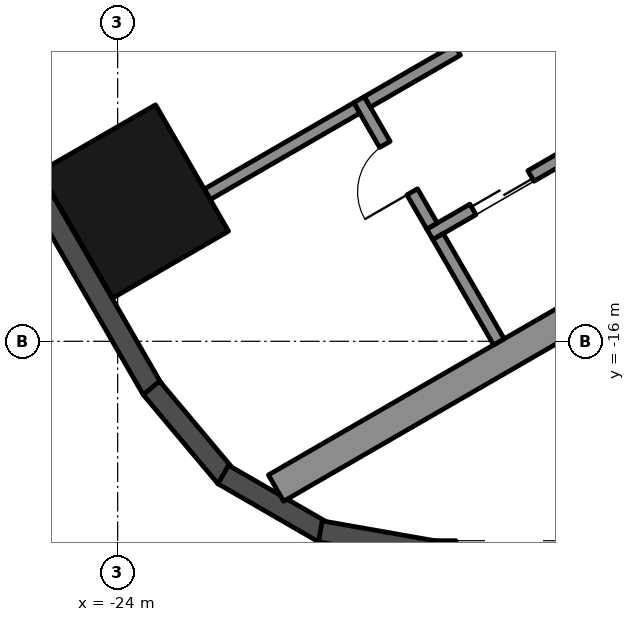
"""IFC4 building model, lengths in metres.
Left out: names, types, materials, properties, quantities, classifications, styles, units other than length and angle.
Written with IfcOpenShell. Run it as: python <this file> out.ifc"""

import sys

from ifc_helpers import new_model, si_unit, direction, frame, frame_2d, origin, origin_2d, place, context, subcontext, project, spatial, rectangle, hollow_rectangle, extrude, element, fill, save


model = new_model("IFC4")
c1 = context("Model", 3, precision=1e-05, world=origin(), true_north=direction((0.0, 1.0)))
c2 = subcontext(c1, "Body", "Model", "MODEL_VIEW")
j1 = project(units=[si_unit("LENGTHUNIT", "METRE"), si_unit("PLANEANGLEUNIT", "RADIAN")], contexts=[c1])
p1 = place(None, origin())
s1 = spatial("IfcSite", under=j1, at=p1, CompositionType="ELEMENT")
p2 = place(p1, origin())
s2 = spatial("IfcBuilding", under=s1, at=p2, CompositionType="ELEMENT")
p3 = place(p2, frame((0.0, 0.0, 198.4)))
s3 = spatial("IfcBuildingStorey", under=s2, at=p3, CompositionType="ELEMENT", Elevation=198.4)
p4 = place(p3, frame((-23.729, -13.7, 0.0), z_axis=(0.0, 0.0, 1.0), x_axis=(-0.5, 0.866025403784, 0.0)))
e1 = element("IfcColumn", 1, at=p4, inside=s3, PredefinedType="COLUMN", context=c2, shape_type="SweptSolid", body=[
    extrude(hollow_rectangle(XDim=2.4, YDim=2.2, WallThickness=0.06, at=origin_2d()), origin(), (0.0, 0.0, 1.0), 3.7),
])
p5 = place(p3, frame((-26.257, -11.893, 0.0), z_axis=(0.0, 0.0, 1.0), x_axis=(0.500018773155, -0.866014564827, 0.0)))
e2 = element("IfcWall", 2, at=p5, inside=s3, PredefinedType="SOLIDWALL", context=c2, shape_type="SweptSolid", body=[
    extrude(rectangle(XDim=5.658, YDim=0.35, at=frame_2d((2.829, 0.0))), origin(), (0.0, 0.0, 1.0), 3.55),
])
for number, where, z_axis, x_axis in (
    (3, (-23.445, -16.768, 0.0), (0.0, 0.0, 1.0), (0.643, -0.766, 0.0)),
    (4, (-22.264, -18.192, 0.0), (0.0, 0.0, 1.0), (0.866, -0.5, 0.0)),
):
    element("IfcWall", number, at=place(p3, frame(where, z_axis=z_axis, x_axis=x_axis)), inside=s3, PredefinedType="SOLIDWALL", context=c2, shape_type="SweptSolid", body=[
        extrude(rectangle(XDim=1.91, YDim=0.35, at=frame_2d((0.955, 0.0))), origin(), (0.0, 0.0, 1.0), 3.55),
    ])
p6 = place(p3, frame((-20.667, -19.126, 0.0), z_axis=(0.0, 0.0, 1.0), x_axis=(0.984798995425, -0.173697837091, 0.0)))
e5 = element("IfcWall", 5, at=p6, inside=s3, PredefinedType="SOLIDWALL", context=c2, shape_type="SweptSolid", body=[
    extrude(rectangle(XDim=1.91, YDim=0.35, at=frame_2d((0.955, 0.0))), origin(), (0.0, 0.0, 1.0), 3.55),
])
p7 = place(p3, frame((-18.816, -19.455, 0.0), z_axis=(0.0, 0.0, 1.0), x_axis=(1.0, 0.0, 0.0)))
e6 = element("IfcWall", 6, at=p7, inside=s3, PredefinedType="SOLIDWALL", context=c2, shape_type="SweptSolid", body=[
    extrude(rectangle(XDim=11.816, YDim=0.35, at=frame_2d((5.908, 0.0))), origin(), (0.0, 0.0, 1.0), 3.55),
])
p8 = place(p7, frame((0.381, 0.0, 0.3)))
e7 = element("IfcOpeningElement", 7, at=p8, cuts=e6, PredefinedType="OPENING", context=c2, shape_type="SweptSolid", body=[
    extrude(rectangle(XDim=1.9, YDim=2.65, at=frame_2d((0.95, 1.325))), frame((0.0, 0.185, 0.0), z_axis=(0.0, -1.0, 0.0), x_axis=(1.0, 0.0, 0.0)), (0.0, 0.0, 1.0), 0.37),
])
p9 = place(p7, frame((7.79, 0.0, 0.0)))
e8 = element("IfcOpeningElement", 8, at=p9, cuts=e6, PredefinedType="OPENING", context=c2, shape_type="SweptSolid", body=[
    extrude(rectangle(XDim=2.4, YDim=2.4, at=frame_2d((1.2, 1.2))), frame((0.0, 0.185, 0.0), z_axis=(0.0, -1.0, 0.0), x_axis=(1.0, 0.0, 0.0)), (0.0, 0.0, 1.0), 0.37),
])
p10 = place(p7, frame((3.741, 0.0, 0.3)))
e9 = element("IfcOpeningElement", 9, at=p10, cuts=e6, PredefinedType="OPENING", context=c2, shape_type="SweptSolid", body=[
    extrude(rectangle(XDim=1.7, YDim=2.65, at=frame_2d((0.85, 1.325))), frame((0.0, 0.185, 0.0), z_axis=(0.0, -1.0, 0.0), x_axis=(1.0, 0.0, 0.0)), (0.0, 0.0, 1.0), 0.37),
])
p11 = place(p7, frame((5.741, 0.0, 0.3)))
e10 = element("IfcOpeningElement", 10, at=p11, cuts=e6, PredefinedType="OPENING", context=c2, shape_type="SweptSolid", body=[
    extrude(rectangle(XDim=1.7, YDim=2.65, at=frame_2d((0.85, 1.325))), frame((0.0, 0.185, 0.0), z_axis=(0.0, -1.0, 0.0), x_axis=(1.0, 0.0, 0.0)), (0.0, 0.0, 1.0), 0.37),
])
p12 = place(p3, frame((-8.547, -10.997, 0.0), z_axis=(0.0, 0.0, 1.0), x_axis=(-0.866025009528, -0.500000682871, 0.0)))
e11 = element("IfcWall", 11, at=p12, inside=s3, PredefinedType="SHEAR", context=c2, shape_type="SweptSolid", body=[
    extrude(rectangle(XDim=14.837, YDim=0.5, at=frame_2d((7.418, 0.0))), origin(), (0.0, 0.0, 1.0), 3.5),
])
p13 = place(p3, frame((-10.068, -9.162, 0.0), z_axis=(0.0, 0.0, 1.0), x_axis=(-0.866032725843, -0.499987317609, 0.0)))
e12 = element("IfcWall", 12, at=p13, inside=s3, PredefinedType="SHEAR", context=c2, shape_type="SweptSolid", body=[
    extrude(rectangle(XDim=10.16, YDim=0.2, at=frame_2d((5.08, 0.0))), origin(), (0.0, 0.0, 1.0), 3.5),
])
p14 = place(p13, frame((0.62, 0.0, 0.0)))
e13 = element("IfcOpeningElement", 13, at=p14, cuts=e12, PredefinedType="OPENING", context=c2, shape_type="SweptSolid", body=[
    extrude(rectangle(XDim=1.1, YDim=2.1, at=frame_2d((0.55, 1.05))), frame((0.0, 0.11, 0.0), z_axis=(0.0, -1.0, 0.0), x_axis=(1.0, 0.0, 0.0)), (0.0, 0.0, 1.0), 0.22),
])
p15 = place(p13, frame((3.16, 0.0, 0.0)))
e14 = element("IfcOpeningElement", 14, at=p15, cuts=e12, PredefinedType="OPENING", context=c2, shape_type="SweptSolid", body=[
    extrude(rectangle(XDim=1.1, YDim=2.1, at=frame_2d((0.55, 1.05))), frame((0.0, 0.11, 0.0), z_axis=(0.0, -1.0, 0.0), x_axis=(1.0, 0.0, 0.0)), (0.0, 0.0, 1.0), 0.22),
])
p16 = place(p13, frame((5.7, 0.0, 0.0)))
e15 = element("IfcOpeningElement", 15, at=p16, cuts=e12, PredefinedType="OPENING", context=c2, shape_type="SweptSolid", body=[
    extrude(rectangle(XDim=1.1, YDim=2.1, at=frame_2d((0.55, 1.05))), frame((0.0, 0.11, 0.0), z_axis=(0.0, -1.0, 0.0), x_axis=(1.0, 0.0, 0.0)), (0.0, 0.0, 1.0), 0.22),
])
p17 = place(p13, frame((8.24, 0.0, 0.0)))
e16 = element("IfcOpeningElement", 16, at=p17, cuts=e12, PredefinedType="OPENING", context=c2, shape_type="SweptSolid", body=[
    extrude(rectangle(XDim=1.1, YDim=2.1, at=frame_2d((0.55, 1.05))), frame((0.0, 0.11, 0.0), z_axis=(0.0, -1.0, 0.0), x_axis=(1.0, 0.0, 0.0)), (0.0, 0.0, 1.0), 0.22),
])
p18 = place(p3, frame((-20.031, -12.026, 0.0), z_axis=(0.0, 0.0, 1.0), x_axis=(0.500033551112, -0.866006032174, 0.0)))
e17 = element("IfcWall", 17, at=p18, inside=s3, PredefinedType="SHEAR", context=c2, shape_type="SweptSolid", body=[
    extrude(rectangle(XDim=2.4, YDim=0.2, at=frame_2d((1.2, 0.0))), origin(), (0.0, 0.0, 1.0), 3.5),
])
p19 = place(p18, frame((0.85, 0.0, 0.0)))
e18 = element("IfcOpeningElement", 18, at=p19, cuts=e17, PredefinedType="OPENING", context=c2, shape_type="SweptSolid", body=[
    extrude(rectangle(XDim=0.9, YDim=2.1, at=frame_2d((0.45, 1.05))), frame((0.0, 0.11, 0.0), z_axis=(0.0, -1.0, 0.0), x_axis=(1.0, 0.0, 0.0)), (0.0, 0.0, 1.0), 0.22),
])
p20 = place(p3, frame((-18.413, -11.208, 0.0), z_axis=(0.0, 0.0, 1.0), x_axis=(-0.866038183914, -0.499977863513, 0.0)))
e19 = element("IfcWall", 19, at=p20, inside=s3, PredefinedType="SHEAR", context=c2, shape_type="SweptSolid", body=[
    extrude(rectangle(XDim=1.71, YDim=0.2, at=frame_2d((0.855, 0.0))), origin(), (0.0, 0.0, 1.0), 3.5),
])
p21 = place(p3, frame((-18.73, -14.278, 0.0), z_axis=(0.0, 0.0, 1.0), x_axis=(0.50002537861, -0.866010750942, 0.0)))
e20 = element("IfcWall", 20, at=p21, inside=s3, PredefinedType="SHEAR", context=c2, shape_type="SweptSolid", body=[
    extrude(rectangle(XDim=2.0, YDim=0.2, at=frame_2d((1.0, 0.0))), origin(), (0.0, 0.0, 1.0), 3.5),
])
p22 = place(p3, frame((-20.067, -12.163, 0.0), z_axis=(0.0, 0.0, 1.0), x_axis=(-0.866055327414, -0.49994816717, 0.0)))
e21 = element("IfcWall", 21, at=p22, inside=s3, PredefinedType="SHEAR", context=c2, shape_type="SweptSolid", body=[
    extrude(rectangle(XDim=2.84, YDim=0.2, at=frame_2d((1.42, 0.0))), origin(), (0.0, 0.0, 1.0), 3.5),
])
p23 = place(p17, origin())
e22 = element("IfcDoor", 22, at=p23, inside=s3, OperationType="DOUBLE_DOOR_SLIDING", PredefinedType="DOOR", context=c2, shape_type="SweptSolid", body=[
    extrude(rectangle(XDim=1.1, YDim=2.1, at=frame_2d((0.55, 1.05))), frame((0.0, 0.025, 0.0), z_axis=(0.0, -1.0, 0.0), x_axis=(1.0, 0.0, 0.0)), (0.0, 0.0, 1.0), 0.05),
])
fill(e16, e22)
p24 = place(p19, frame((0.9, 0.0, 0.0), z_axis=(0.0, 0.0, 1.0), x_axis=(-1.0, 0.0, 0.0)))
e23 = element("IfcDoor", 23, at=p24, inside=s3, OperationType="SINGLE_SWING_LEFT", PredefinedType="DOOR", context=c2, shape_type="SweptSolid", body=[
    extrude(rectangle(XDim=0.9, YDim=2.1, at=frame_2d((0.45, 1.05))), frame((0.0, 0.025, 0.0), z_axis=(0.0, -1.0, 0.0), x_axis=(1.0, 0.0, 0.0)), (0.0, 0.0, 1.0), 0.05),
])
fill(e18, e23)
save(model, sys.argv[1])
